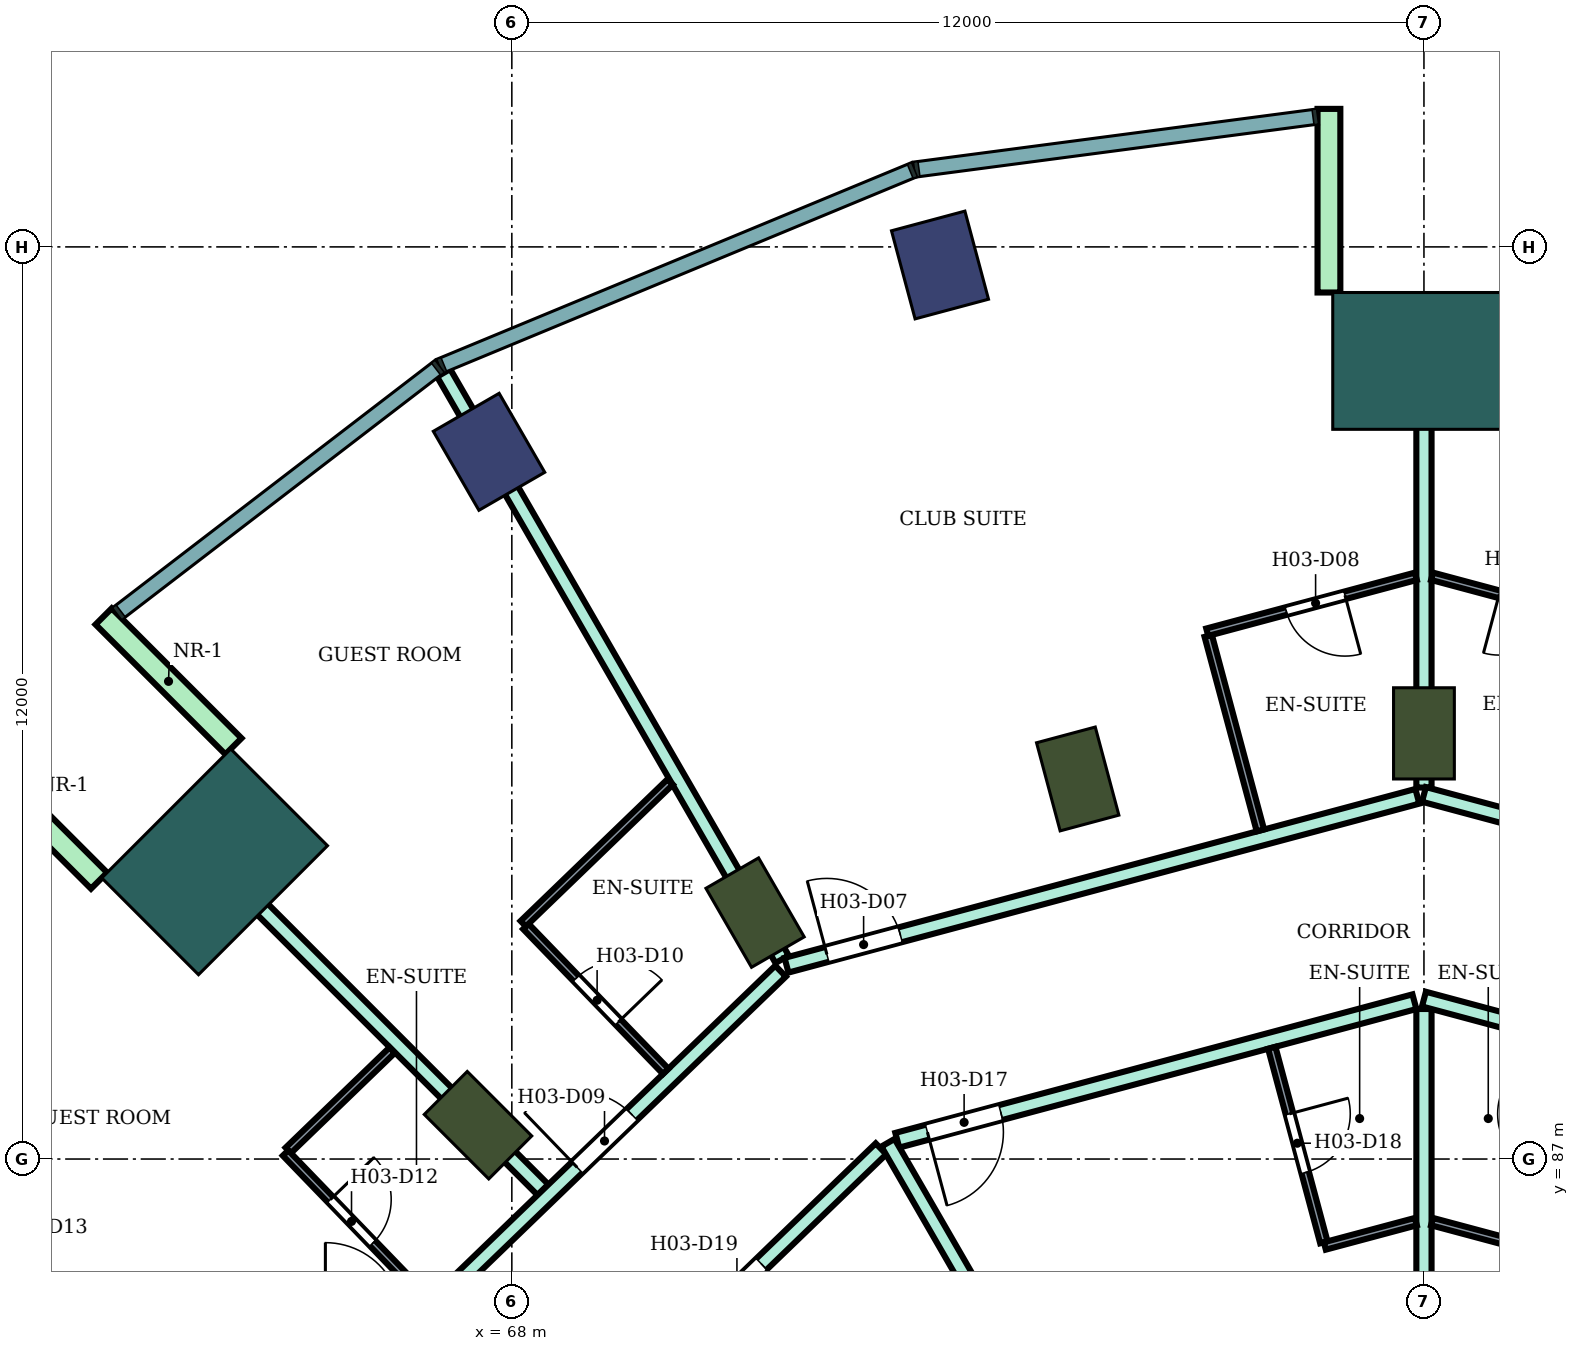
"""IFC4 building model, lengths in metres.
Left out: names, types, materials, properties, quantities, classifications, styles, units other than length and angle.
Written with IfcOpenShell. Run it as: python <this file> out.ifc"""

import sys

from ifc_helpers import new_model, si_unit, direction, frame, frame_2d, origin, origin_2d, place, context, subcontext, project, spatial, rectangle, extrude, element, fill, save


model = new_model("IFC4")
c1 = context("Model", 3, precision=1e-05, world=origin(), true_north=direction((0.0, 1.0)))
c2 = subcontext(c1, "Body", "Model", "MODEL_VIEW")
j1 = project(units=[si_unit("LENGTHUNIT", "METRE"), si_unit("PLANEANGLEUNIT", "RADIAN")], contexts=[c1])
p1 = place(None, origin())
s1 = spatial("IfcSite", under=j1, at=p1, CompositionType="ELEMENT")
p2 = place(p1, origin())
s2 = spatial("IfcBuilding", under=s1, at=p2, CompositionType="ELEMENT")
p3 = place(p2, frame((0.0, 0.0, 55.4)))
s3 = spatial("IfcBuildingStorey", under=s2, at=p3, CompositionType="ELEMENT", Elevation=55.4)
for number, where, z_axis, x_axis in (
    (1, (73.633, 98.762, 0.0), (0.0, 0.0, 1.0), (-0.259, 0.966, 0.0)),
    (2, (67.7, 96.304, 0.0), (0.0, 0.0, 1.0), (-0.5, 0.866, 0.0)),
):
    element("IfcColumn", number, at=place(p3, frame(where, z_axis=z_axis, x_axis=x_axis)), inside=s3, PredefinedType="COLUMN", context=c2, shape_type="SweptSolid", body=[
        extrude(rectangle(XDim=1.2, YDim=1.0, at=origin_2d()), origin(), (0.0, 0.0, 1.0), 3.8),
    ])
for number, where, z_axis, x_axis in (
    (3, (80.0, 92.6, 0.0), (0.0, 0.0, 1.0), (0.0, 1.0, 0.0)),
    (4, (75.445, 92.0, 0.0), (0.0, 0.0, 1.0), (-0.259, 0.966, 0.0)),
    (5, (71.2, 90.242, 0.0), (0.0, 0.0, 1.0), (-0.5, 0.866, 0.0)),
    (6, (67.555, 87.445, 0.0), (0.0, 0.0, 1.0), (-0.707, 0.707, 0.0)),
):
    element("IfcColumn", number, at=place(p3, frame(where, z_axis=z_axis, x_axis=x_axis)), inside=s3, PredefinedType="COLUMN", context=c2, shape_type="SweptSolid", body=[
        extrude(rectangle(XDim=1.2, YDim=0.8, at=origin_2d()), origin(), (0.0, 0.0, 1.0), 3.8),
    ])
for number, where, z_axis, x_axis in (
    (7, (80.0, 97.5, 0.0), (0.0, 0.0, 1.0), (0.0, 1.0, 0.0)),
    (8, (64.09, 90.91, 0.0), (0.0, 0.0, 1.0), (-0.707, 0.707, 0.0)),
):
    element("IfcColumn", number, at=place(p3, frame(where, z_axis=z_axis, x_axis=x_axis)), inside=s3, PredefinedType="COLUMN", context=c2, shape_type="SweptSolid", body=[
        extrude(rectangle(XDim=1.8, YDim=2.4, at=origin_2d()), origin(), (0.0, 0.0, 1.0), 3.8),
    ])
for number, where, z_axis, x_axis in (
    (9, (78.75, 98.4, 0.0), (0.0, 0.0, 1.0), (0.0, 1.0, 0.0)),
    (10, (64.338, 92.43, 0.0), (0.0, 0.0, 1.0), (-0.707, 0.707, 0.0)),
    (11, (62.57, 90.662, 0.0), (0.0, 0.0, 1.0), (-0.707, 0.707, 0.0)),
):
    element("IfcWall", number, at=place(p3, frame(where, z_axis=z_axis, x_axis=x_axis)), inside=s3, PredefinedType="NOTDEFINED", context=c2, shape_type="SweptSolid", body=[
        extrude(rectangle(XDim=2.416, YDim=0.3, at=frame_2d((1.208, 0.0))), origin(), (0.0, 0.0, 1.0), 3.8),
    ])
p4 = place(p3, frame((63.598, 91.408, 0.0), z_axis=(0.0, 0.0, 1.0), x_axis=(0.706999146394, -0.707214399597, 0.0)))
e12 = element("IfcWall", 12, at=p4, inside=s3, PredefinedType="PARTITIONING", context=c2, shape_type="SweptSolid", body=[
    extrude(rectangle(XDim=6.805, YDim=0.2, at=frame_2d((3.403, 0.0))), origin(), (0.0, 0.0, 1.0), 3.35),
])
p5 = place(p3, frame((66.797, 84.9, 0.0), z_axis=(0.0, 0.0, 1.0), x_axis=(0.719692092412, 0.694293376116, 0.0)))
e13 = element("IfcWall", 13, at=p5, inside=s3, PredefinedType="PARTITIONING", context=c2, shape_type="SweptSolid", body=[
    extrude(rectangle(XDim=6.584, YDim=0.2, at=frame_2d((3.292, 0.0))), origin(), (0.0, 0.0, 1.0), 3.35),
])
p6 = place(p5, frame((2.866, 0.0, 0.0)))
e14 = element("IfcOpeningElement", 14, at=p6, cuts=e13, PredefinedType="OPENING", context=c2, shape_type="SweptSolid", body=[
    extrude(rectangle(XDim=1.0, YDim=2.1, at=frame_2d((0.5, 1.05))), frame((0.0, 0.11, 0.0), z_axis=(0.0, -1.0, 0.0), x_axis=(1.0, 0.0, 0.0)), (0.0, 0.0, 1.0), 0.22),
])
p7 = place(p3, frame((67.103, 97.342, 0.0), z_axis=(0.0, 0.0, 1.0), x_axis=(0.499906738326, -0.866079241742, 0.0)))
e15 = element("IfcWall", 15, at=p7, inside=s3, PredefinedType="PARTITIONING", context=c2, shape_type="SweptSolid", body=[
    extrude(rectangle(XDim=8.907, YDim=0.2, at=frame_2d((4.454, 0.0))), origin(), (0.0, 0.0, 1.0), 3.35),
])
p8 = place(p3, frame((68.987, 83.4, 0.0), z_axis=(0.0, 0.0, 1.0), x_axis=(0.719547721855, 0.694442996922, 0.0)))
e16 = element("IfcWall", 16, at=p8, inside=s3, PredefinedType="PARTITIONING", context=c2, shape_type="SweptSolid", body=[
    extrude(rectangle(XDim=5.378, YDim=0.2, at=frame_2d((2.689, 0.0))), origin(), (0.0, 0.0, 1.0), 3.35),
])
p9 = place(p8, frame((2.294, 0.0, 0.0)))
e17 = element("IfcOpeningElement", 17, at=p9, cuts=e16, PredefinedType="OPENING", context=c2, shape_type="SweptSolid", body=[
    extrude(rectangle(XDim=0.9, YDim=2.1, at=frame_2d((0.45, 1.05))), frame((0.0, 0.11, 0.0), z_axis=(0.0, -1.0, 0.0), x_axis=(1.0, 0.0, 0.0)), (0.0, 0.0, 1.0), 0.22),
])
p10 = place(p3, frame((71.614, 89.55, 0.0), z_axis=(0.0, 0.0, 1.0), x_axis=(0.965967958589, 0.258661753994, 0.0)))
e18 = element("IfcWall", 18, at=p10, inside=s3, PredefinedType="PARTITIONING", context=c2, shape_type="SweptSolid", body=[
    extrude(rectangle(XDim=8.592, YDim=0.2, at=frame_2d((4.296, 0.0))), origin(), (0.0, 0.0, 1.0), 3.35),
])
p11 = place(p10, frame((0.55, 0.0, 0.0)))
e19 = element("IfcOpeningElement", 19, at=p11, cuts=e18, PredefinedType="OPENING", context=c2, shape_type="SweptSolid", body=[
    extrude(rectangle(XDim=1.0, YDim=2.1, at=frame_2d((0.5, 1.05))), frame((0.0, 0.11, 0.0), z_axis=(0.0, -1.0, 0.0), x_axis=(1.0, 0.0, 0.0)), (0.0, 0.0, 1.0), 0.22),
])
p12 = place(p3, frame((73.071, 87.247, 0.0), z_axis=(0.0, 0.0, 1.0), x_axis=(0.965931651205, 0.258797305243, 0.0)))
e20 = element("IfcWall", 20, at=p12, inside=s3, PredefinedType="PARTITIONING", context=c2, shape_type="SweptSolid", body=[
    extrude(rectangle(XDim=7.043, YDim=0.2, at=frame_2d((3.521, 0.0))), origin(), (0.0, 0.0, 1.0), 3.35),
])
p13 = place(p12, frame((0.41, 0.0, 0.0)))
e21 = element("IfcOpeningElement", 21, at=p13, cuts=e20, PredefinedType="OPENING", context=c2, shape_type="SweptSolid", body=[
    extrude(rectangle(XDim=1.0, YDim=2.1, at=frame_2d((0.5, 1.05))), frame((0.0, 0.11, 0.0), z_axis=(0.0, -1.0, 0.0), x_axis=(1.0, 0.0, 0.0)), (0.0, 0.0, 1.0), 0.22),
])
p14 = place(p3, frame((72.949, 87.214, 0.0), z_axis=(0.0, 0.0, 1.0), x_axis=(0.499927021214, -0.866067534006, 0.0)))
e22 = element("IfcWall", 22, at=p14, inside=s3, PredefinedType="PARTITIONING", context=c2, shape_type="SweptSolid", body=[
    extrude(rectangle(XDim=6.405, YDim=0.2, at=frame_2d((3.203, 0.0))), origin(), (0.0, 0.0, 1.0), 3.35),
])
p15 = place(p3, frame((80.0, 82.699, 0.0), z_axis=(0.0, 0.0, 1.0), x_axis=(0.0, 1.0, 0.0)))
e23 = element("IfcWall", 23, at=p15, inside=s3, PredefinedType="PARTITIONING", context=c2, shape_type="SweptSolid", body=[
    extrude(rectangle(XDim=6.275, YDim=0.2, at=frame_2d((3.138, 0.0))), origin(), (0.0, 0.0, 1.0), 3.35),
])
p16 = place(p3, frame((80.0, 89.104, 0.0), z_axis=(0.0, 0.0, 1.0), x_axis=(0.965856548257, -0.259077455964, 0.0)))
e24 = element("IfcWall", 24, at=p16, inside=s3, PredefinedType="PARTITIONING", context=c2, shape_type="SweptSolid", body=[
    extrude(rectangle(XDim=7.173, YDim=0.2, at=frame_2d((3.586, 0.0))), origin(), (0.0, 0.0, 1.0), 3.35),
])
p17 = place(p16, frame((5.763, 0.0, 0.0)))
e25 = element("IfcOpeningElement", 25, at=p17, cuts=e24, PredefinedType="OPENING", context=c2, shape_type="SweptSolid", body=[
    extrude(rectangle(XDim=1.0, YDim=2.1, at=frame_2d((0.5, 1.05))), frame((0.0, 0.11, 0.0), z_axis=(0.0, -1.0, 0.0), x_axis=(1.0, 0.0, 0.0)), (0.0, 0.0, 1.0), 0.22),
])
p18 = place(p3, frame((80.0, 91.887, 0.0), z_axis=(0.0, 0.0, 1.0), x_axis=(0.0, 1.0, 0.0)))
e26 = element("IfcWall", 26, at=p18, inside=s3, PredefinedType="PARTITIONING", context=c2, shape_type="SweptSolid", body=[
    extrude(rectangle(XDim=6.312, YDim=0.2, at=frame_2d((3.156, 0.0))), origin(), (0.0, 0.0, 1.0), 3.35),
])
p19 = place(p3, frame((80.0, 91.797, 0.0), z_axis=(0.0, 0.0, 1.0), x_axis=(0.965857042792, -0.259075612301, 0.0)))
e27 = element("IfcWall", 27, at=p19, inside=s3, PredefinedType="PARTITIONING", context=c2, shape_type="SweptSolid", body=[
    extrude(rectangle(XDim=8.602, YDim=0.2, at=frame_2d((4.301, 0.0))), origin(), (0.0, 0.0, 1.0), 3.35),
])
p20 = place(p19, frame((4.877, 0.0, 0.0)))
e28 = element("IfcOpeningElement", 28, at=p20, cuts=e27, PredefinedType="OPENING", context=c2, shape_type="SweptSolid", body=[
    extrude(rectangle(XDim=1.0, YDim=2.1, at=frame_2d((0.5, 1.05))), frame((0.0, 0.11, 0.0), z_axis=(0.0, -1.0, 0.0), x_axis=(1.0, 0.0, 0.0)), (0.0, 0.0, 1.0), 0.22),
])
p21 = place(p19, frame((2.817, 0.0, 0.0)))
e29 = element("IfcOpeningElement", 29, at=p21, cuts=e27, PredefinedType="OPENING", context=c2, shape_type="SweptSolid", body=[
    extrude(rectangle(XDim=1.0, YDim=2.1, at=frame_2d((0.5, 1.05))), frame((0.0, 0.11, 0.0), z_axis=(0.0, -1.0, 0.0), x_axis=(1.0, 0.0, 0.0)), (0.0, 0.0, 1.0), 0.22),
])
p22 = place(p3, frame((57.659, 87.899, 0.0), z_axis=(0.0, 0.0, 1.0), x_axis=(0.86602264145, -0.500004784474, 0.0)))
e30 = element("IfcWall", 30, at=p22, inside=s3, PredefinedType="PARTITIONING", context=c2, shape_type="SweptSolid", body=[
    extrude(rectangle(XDim=8.708, YDim=0.1, at=frame_2d((4.354, 0.0))), origin(), (0.0, 0.0, 1.0), 3.35),
])
p23 = place(p22, frame((3.929, 0.0, 0.0)))
e31 = element("IfcOpeningElement", 31, at=p23, cuts=e30, PredefinedType="OPENING", context=c2, shape_type="SweptSolid", body=[
    extrude(rectangle(XDim=0.9, YDim=2.1, at=frame_2d((0.45, 1.05))), frame((0.0, 0.06, 0.0), z_axis=(0.0, -1.0, 0.0), x_axis=(1.0, 0.0, 0.0)), (0.0, 0.0, 1.0), 0.12),
])
p24 = place(p3, frame((65.059, 87.114, 0.0), z_axis=(0.0, 0.0, 1.0), x_axis=(0.719715847356, 0.694268751324, 0.0)))
e32 = element("IfcWall", 32, at=p24, inside=s3, PredefinedType="PARTITIONING", context=c2, shape_type="SweptSolid", body=[
    extrude(rectangle(XDim=1.9, YDim=0.1, at=frame_2d((0.95, 0.0))), origin(), (0.0, 0.0, 1.0), 3.35),
])
p25 = place(p3, frame((65.023, 87.079, 0.0), z_axis=(0.0, 0.0, 1.0), x_axis=(0.694287838235, -0.719697434815, 0.0)))
e33 = element("IfcWall", 33, at=p25, inside=s3, PredefinedType="PARTITIONING", context=c2, shape_type="SweptSolid", body=[
    extrude(rectangle(XDim=2.7, YDim=0.1, at=frame_2d((1.35, 0.0))), origin(), (0.0, 0.0, 1.0), 3.35),
])
p26 = place(p25, frame((0.85, 0.0, 0.0)))
e34 = element("IfcOpeningElement", 34, at=p26, cuts=e33, PredefinedType="OPENING", context=c2, shape_type="SweptSolid", body=[
    extrude(rectangle(XDim=0.8, YDim=2.1, at=frame_2d((0.4, 1.05))), frame((0.0, 0.06, 0.0), z_axis=(0.0, -1.0, 0.0), x_axis=(1.0, 0.0, 0.0)), (0.0, 0.0, 1.0), 0.12),
])
p27 = place(p3, frame((68.185, 90.06, 0.0), z_axis=(0.0, 0.0, 1.0), x_axis=(0.69446127412, -0.719530081892, 0.0)))
e35 = element("IfcWall", 35, at=p27, inside=s3, PredefinedType="PARTITIONING", context=c2, shape_type="SweptSolid", body=[
    extrude(rectangle(XDim=2.649, YDim=0.1, at=frame_2d((1.324, 0.0))), origin(), (0.0, 0.0, 1.0), 3.35),
])
p28 = place(p27, frame((0.95, 0.0, 0.0)))
e36 = element("IfcOpeningElement", 36, at=p28, cuts=e35, PredefinedType="OPENING", context=c2, shape_type="SweptSolid", body=[
    extrude(rectangle(XDim=0.8, YDim=2.1, at=frame_2d((0.4, 1.05))), frame((0.0, 0.06, 0.0), z_axis=(0.0, -1.0, 0.0), x_axis=(1.0, 0.0, 0.0)), (0.0, 0.0, 1.0), 0.12),
])
p29 = place(p3, frame((68.15, 90.096, 0.0), z_axis=(0.0, 0.0, 1.0), x_axis=(0.719667544954, 0.694318820672, 0.0)))
e37 = element("IfcWall", 37, at=p29, inside=s3, PredefinedType="PARTITIONING", context=c2, shape_type="SweptSolid", body=[
    extrude(rectangle(XDim=2.687, YDim=0.1, at=frame_2d((1.344, 0.0))), origin(), (0.0, 0.0, 1.0), 3.35),
])
p30 = place(p3, frame((77.162, 93.883, 0.0), z_axis=(0.0, 0.0, 1.0), x_axis=(0.258998589493, -0.965877699629, 0.0)))
e38 = element("IfcWall", 38, at=p30, inside=s3, PredefinedType="PARTITIONING", context=c2, shape_type="SweptSolid", body=[
    extrude(rectangle(XDim=2.65, YDim=0.1, at=frame_2d((1.325, 0.0))), origin(), (0.0, 0.0, 1.0), 3.35),
])
p31 = place(p3, frame((77.149, 93.931, 0.0), z_axis=(0.0, 0.0, 1.0), x_axis=(0.965916219953, 0.258854893776, 0.0)))
e39 = element("IfcWall", 39, at=p31, inside=s3, PredefinedType="PARTITIONING", context=c2, shape_type="SweptSolid", body=[
    extrude(rectangle(XDim=2.842, YDim=0.1, at=frame_2d((1.421, 0.0))), origin(), (0.0, 0.0, 1.0), 3.35),
])
p32 = place(p31, frame((1.076, 0.0, 0.0)))
e40 = element("IfcOpeningElement", 40, at=p32, cuts=e39, PredefinedType="OPENING", context=c2, shape_type="SweptSolid", body=[
    extrude(rectangle(XDim=0.8, YDim=2.1, at=frame_2d((0.4, 1.05))), frame((0.0, 0.06, 0.0), z_axis=(0.0, -1.0, 0.0), x_axis=(1.0, 0.0, 0.0)), (0.0, 0.0, 1.0), 0.12),
])
p33 = place(p3, frame((77.998, 88.463, 0.0), z_axis=(0.0, 0.0, 1.0), x_axis=(0.258677737588, -0.965963678446, 0.0)))
e41 = element("IfcWall", 41, at=p33, inside=s3, PredefinedType="PARTITIONING", context=c2, shape_type="SweptSolid", body=[
    extrude(rectangle(XDim=2.649, YDim=0.1, at=frame_2d((1.325, 0.0))), origin(), (0.0, 0.0, 1.0), 3.35),
])
p34 = place(p33, frame((0.9, 0.0, 0.0)))
e42 = element("IfcOpeningElement", 42, at=p34, cuts=e41, PredefinedType="OPENING", context=c2, shape_type="SweptSolid", body=[
    extrude(rectangle(XDim=0.8, YDim=2.1, at=frame_2d((0.4, 1.05))), frame((0.0, 0.06, 0.0), z_axis=(0.0, -1.0, 0.0), x_axis=(1.0, 0.0, 0.0)), (0.0, 0.0, 1.0), 0.12),
])
p35 = place(p3, frame((78.696, 85.856, 0.0), z_axis=(0.0, 0.0, 1.0), x_axis=(0.966002513606, 0.258532674351, 0.0)))
e43 = element("IfcWall", 43, at=p35, inside=s3, PredefinedType="PARTITIONING", context=c2, shape_type="SweptSolid", body=[
    extrude(rectangle(XDim=1.24, YDim=0.1, at=frame_2d((0.62, 0.0))), origin(), (0.0, 0.0, 1.0), 3.35),
])
p36 = place(p3, frame((80.106, 86.177, 0.0), z_axis=(0.0, 0.0, 1.0), x_axis=(0.966002973184, -0.258530957139, 0.0)))
e44 = element("IfcWall", 44, at=p36, inside=s3, PredefinedType="PARTITIONING", context=c2, shape_type="SweptSolid", body=[
    extrude(rectangle(XDim=1.19, YDim=0.1, at=frame_2d((0.595, 0.0))), origin(), (0.0, 0.0, 1.0), 3.35),
])
p37 = place(p3, frame((80.106, 94.667, 0.0), z_axis=(0.0, 0.0, 1.0), x_axis=(0.965904298007, -0.258899376382, 0.0)))
e45 = element("IfcWall", 45, at=p37, inside=s3, PredefinedType="PARTITIONING", context=c2, shape_type="SweptSolid", body=[
    extrude(rectangle(XDim=2.69, YDim=0.1, at=frame_2d((1.345, 0.0))), origin(), (0.0, 0.0, 1.0), 3.35),
])
p38 = place(p37, frame((0.915, 0.0, 0.0)))
e46 = element("IfcOpeningElement", 46, at=p38, cuts=e45, PredefinedType="OPENING", context=c2, shape_type="SweptSolid", body=[
    extrude(rectangle(XDim=0.8, YDim=2.1, at=frame_2d((0.4, 1.05))), frame((0.0, 0.06, 0.0), z_axis=(0.0, -1.0, 0.0), x_axis=(1.0, 0.0, 0.0)), (0.0, 0.0, 1.0), 0.12),
])
p39 = place(p38, frame((0.8, 0.0, 0.0), z_axis=(0.0, 0.0, 1.0), x_axis=(-1.0, 0.0, 0.0)))
e47 = element("IfcDoor", 47, at=p39, inside=s3, OperationType="SINGLE_SWING_RIGHT", PredefinedType="DOOR", context=c2, shape_type="SweptSolid", body=[
    extrude(rectangle(XDim=0.8, YDim=2.1, at=frame_2d((0.4, 1.05))), frame((0.0, 0.025, 0.0), z_axis=(0.0, -1.0, 0.0), x_axis=(1.0, 0.0, 0.0)), (0.0, 0.0, 1.0), 0.05),
])
fill(e46, e47)
p40 = place(p11, origin())
e48 = element("IfcDoor", 48, at=p40, inside=s3, OperationType="SINGLE_SWING_LEFT", PredefinedType="DOOR", context=c2, shape_type="SweptSolid", body=[
    extrude(rectangle(XDim=1.0, YDim=2.1, at=frame_2d((0.5, 1.05))), frame((0.0, 0.025, 0.0), z_axis=(0.0, -1.0, 0.0), x_axis=(1.0, 0.0, 0.0)), (0.0, 0.0, 1.0), 0.05),
])
fill(e19, e48)
p41 = place(p32, frame((0.8, 0.0, 0.0), z_axis=(0.0, 0.0, 1.0), x_axis=(-1.0, 0.0, 0.0)))
e49 = element("IfcDoor", 49, at=p41, inside=s3, OperationType="SINGLE_SWING_LEFT", PredefinedType="DOOR", context=c2, shape_type="SweptSolid", body=[
    extrude(rectangle(XDim=0.8, YDim=2.1, at=frame_2d((0.4, 1.05))), frame((0.0, 0.025, 0.0), z_axis=(0.0, -1.0, 0.0), x_axis=(1.0, 0.0, 0.0)), (0.0, 0.0, 1.0), 0.05),
])
fill(e40, e49)
p42 = place(p6, origin())
e50 = element("IfcDoor", 50, at=p42, inside=s3, OperationType="SINGLE_SWING_LEFT", PredefinedType="DOOR", context=c2, shape_type="SweptSolid", body=[
    extrude(rectangle(XDim=1.0, YDim=2.1, at=frame_2d((0.5, 1.05))), frame((0.0, 0.025, 0.0), z_axis=(0.0, -1.0, 0.0), x_axis=(1.0, 0.0, 0.0)), (0.0, 0.0, 1.0), 0.05),
])
fill(e14, e50)
p43 = place(p28, origin())
e51 = element("IfcDoor", 51, at=p43, inside=s3, OperationType="SINGLE_SWING_RIGHT", PredefinedType="DOOR", context=c2, shape_type="SweptSolid", body=[
    extrude(rectangle(XDim=0.8, YDim=2.1, at=frame_2d((0.4, 1.05))), frame((0.0, 0.025, 0.0), z_axis=(0.0, -1.0, 0.0), x_axis=(1.0, 0.0, 0.0)), (0.0, 0.0, 1.0), 0.05),
])
fill(e36, e51)
p44 = place(p26, origin())
e52 = element("IfcDoor", 52, at=p44, inside=s3, OperationType="SINGLE_SWING_LEFT", PredefinedType="DOOR", context=c2, shape_type="SweptSolid", body=[
    extrude(rectangle(XDim=0.8, YDim=2.1, at=frame_2d((0.4, 1.05))), frame((0.0, 0.025, 0.0), z_axis=(0.0, -1.0, 0.0), x_axis=(1.0, 0.0, 0.0)), (0.0, 0.0, 1.0), 0.05),
])
fill(e34, e52)
p45 = place(p13, frame((1.0, 0.0, 0.0), z_axis=(0.0, 0.0, 1.0), x_axis=(-1.0, 0.0, 0.0)))
e53 = element("IfcDoor", 53, at=p45, inside=s3, OperationType="SINGLE_SWING_RIGHT", PredefinedType="DOOR", context=c2, shape_type="SweptSolid", body=[
    extrude(rectangle(XDim=1.0, YDim=2.1, at=frame_2d((0.5, 1.05))), frame((0.0, 0.025, 0.0), z_axis=(0.0, -1.0, 0.0), x_axis=(1.0, 0.0, 0.0)), (0.0, 0.0, 1.0), 0.05),
])
fill(e21, e53)
p46 = place(p34, origin())
e54 = element("IfcDoor", 54, at=p46, inside=s3, OperationType="SINGLE_SWING_LEFT", PredefinedType="DOOR", context=c2, shape_type="SweptSolid", body=[
    extrude(rectangle(XDim=0.8, YDim=2.1, at=frame_2d((0.4, 1.05))), frame((0.0, 0.025, 0.0), z_axis=(0.0, -1.0, 0.0), x_axis=(1.0, 0.0, 0.0)), (0.0, 0.0, 1.0), 0.05),
])
fill(e42, e54)
p47 = place(p9, frame((0.9, 0.0, 0.0), z_axis=(0.0, 0.0, 1.0), x_axis=(-1.0, 0.0, 0.0)))
e55 = element("IfcDoor", 55, at=p47, inside=s3, OperationType="SINGLE_SWING_RIGHT", PredefinedType="DOOR", context=c2, shape_type="SweptSolid", body=[
    extrude(rectangle(XDim=0.9, YDim=2.1, at=frame_2d((0.45, 1.05))), frame((0.0, 0.025, 0.0), z_axis=(0.0, -1.0, 0.0), x_axis=(1.0, 0.0, 0.0)), (0.0, 0.0, 1.0), 0.05),
])
fill(e17, e55)
save(model, sys.argv[1])
